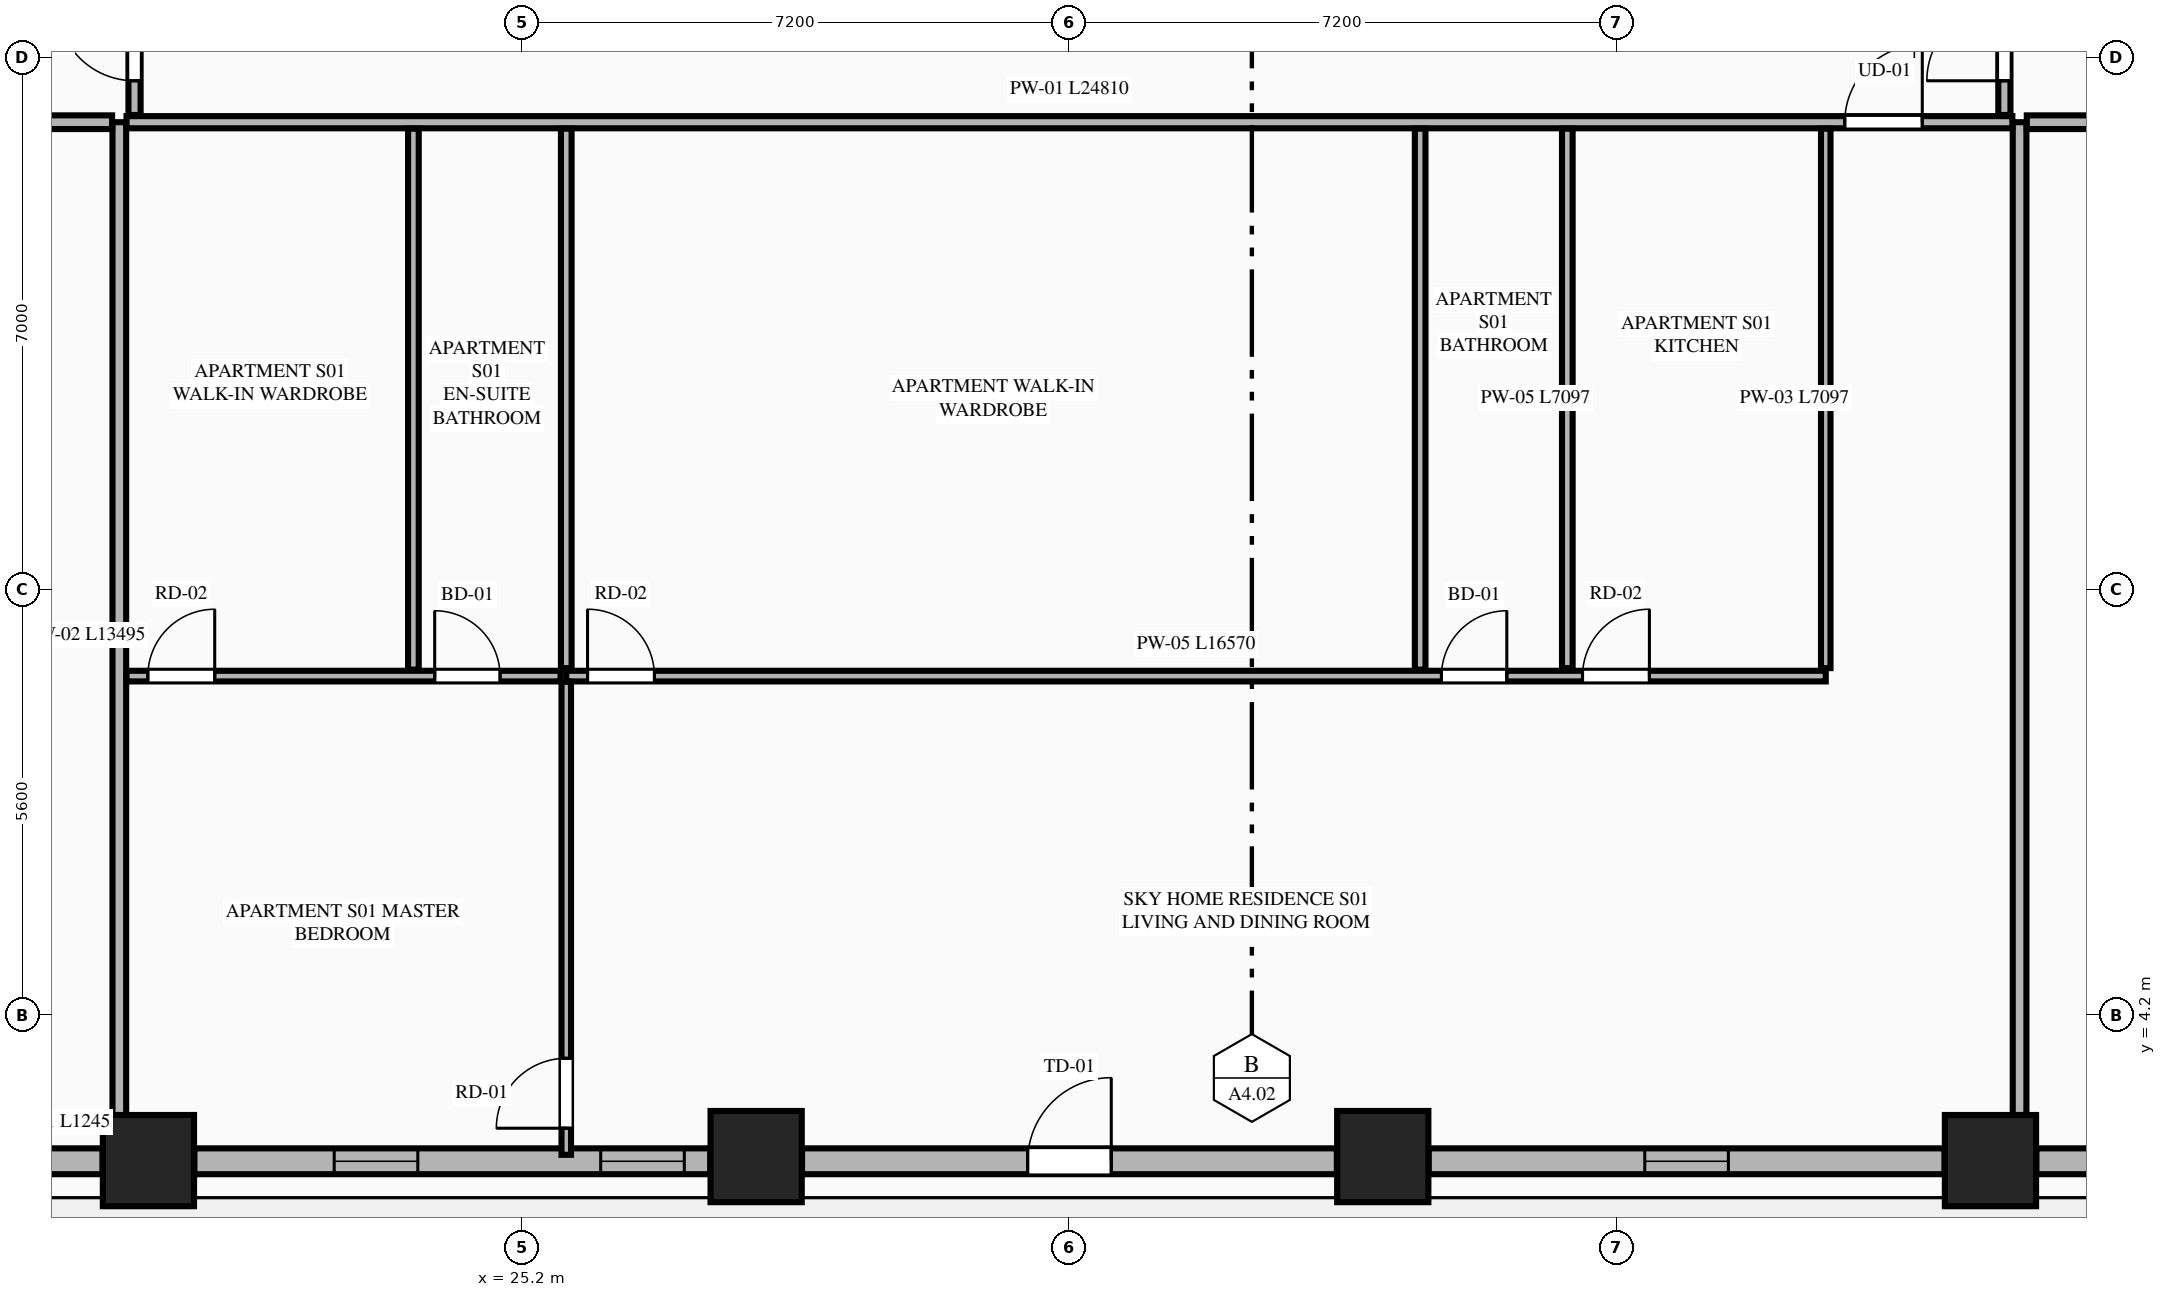
"""IFC4 building model, lengths in metres.
Left out: names, types, materials, properties, quantities, classifications, styles, units other than length and angle.
Written with IfcOpenShell. Run it as: python <this file> out.ifc"""

import sys

from ifc_helpers import new_model, si_unit, direction, frame, frame_2d, origin, origin_2d, place, context, subcontext, project, spatial, rectangle, extrude, element, fill, save


model = new_model("IFC4")
c1 = context("Model", 3, precision=1e-05, world=origin(), true_north=direction((0.0, 1.0)))
c2 = subcontext(c1, "Body", "Model", "MODEL_VIEW")
j1 = project(units=[si_unit("LENGTHUNIT", "METRE"), si_unit("PLANEANGLEUNIT", "RADIAN")], contexts=[c1])
p1 = place(None, origin())
s1 = spatial("IfcSite", under=j1, at=p1, CompositionType="ELEMENT")
p2 = place(p1, origin())
s2 = spatial("IfcBuilding", under=s1, at=p2, CompositionType="ELEMENT")
p3 = place(p2, frame((0.0, 0.0, 46.2)))
s3 = spatial("IfcBuildingStorey", under=s2, at=p3, CompositionType="ELEMENT", Elevation=46.2)
for number, where, z_axis, x_axis in (
    (1, (20.283, 2.289, 0.0), (0.0, 0.0, 1.0), (1.0, 0.0, 0.0)),
    (2, (28.278, 2.342, 0.0), (0.0, 0.0, 1.0), (1.0, 0.0, 0.0)),
    (3, (36.522, 2.342, 0.0), (0.0, 0.0, 1.0), (1.0, 0.0, 0.0)),
    (4, (44.517, 2.289, 0.0), (0.0, 0.0, 1.0), (1.0, 0.0, 0.0)),
):
    element("IfcColumn", number, at=place(p3, frame(where, z_axis=z_axis, x_axis=x_axis)), inside=s3, PredefinedType="COLUMN", context=c2, shape_type="SweptSolid", body=[
        extrude(rectangle(XDim=1.2, YDim=1.2, at=origin_2d()), origin(), (0.0, 0.0, 1.0), 3.55),
    ])
p4 = place(p3, frame((18.434, 2.28, 0.0), z_axis=(0.0, 0.0, 1.0), x_axis=(1.0, 0.0, 0.0)))
e5 = element("IfcWall", 5, at=p4, inside=s3, PredefinedType="STANDARD", context=c2, shape_type="SweptSolid", body=[
    extrude(rectangle(XDim=1.245, YDim=0.34, at=frame_2d((0.623, 0.0))), origin(), (0.0, 0.0, 1.0), 3.33),
])
p5 = place(p3, frame((20.887, 2.28, 0.0), z_axis=(0.0, 0.0, 1.0), x_axis=(1.0, 0.0, 0.0)))
e6 = element("IfcWall", 6, at=p5, inside=s3, PredefinedType="STANDARD", context=c2, shape_type="SweptSolid", body=[
    extrude(rectangle(XDim=6.787, YDim=0.34, at=frame_2d((3.394, 0.0))), origin(), (0.0, 0.0, 1.0), 2.787),
])
p6 = place(p5, frame((1.84, 0.0, 0.75)))
e7 = element("IfcOpeningElement", 7, at=p6, cuts=e6, PredefinedType="OPENING", context=c2, shape_type="SweptSolid", body=[
    extrude(rectangle(XDim=1.1, YDim=1.887, at=frame_2d((0.55, 0.943))), frame((0.0, 0.18, 0.0), z_axis=(0.0, -1.0, 0.0), x_axis=(1.0, 0.0, 0.0)), (0.0, 0.0, 1.0), 0.36),
])
p7 = place(p5, frame((5.346, 0.0, 0.75)))
e8 = element("IfcOpeningElement", 8, at=p7, cuts=e6, PredefinedType="OPENING", context=c2, shape_type="SweptSolid", body=[
    extrude(rectangle(XDim=1.1, YDim=1.887, at=frame_2d((0.55, 0.943))), frame((0.0, 0.18, 0.0), z_axis=(0.0, -1.0, 0.0), x_axis=(1.0, 0.0, 0.0)), (0.0, 0.0, 1.0), 0.36),
])
p8 = place(p3, frame((28.882, 2.28, 0.0), z_axis=(0.0, 0.0, 1.0), x_axis=(1.0, 0.0, 0.0)))
e9 = element("IfcWall", 9, at=p8, inside=s3, PredefinedType="STANDARD", context=c2, shape_type="SweptSolid", body=[
    extrude(rectangle(XDim=7.036, YDim=0.34, at=frame_2d((3.518, 0.0))), origin(), (0.0, 0.0, 1.0), 2.787),
])
p9 = place(p8, frame((2.968, 0.0, 0.0)))
e10 = element("IfcOpeningElement", 10, at=p9, cuts=e9, PredefinedType="OPENING", context=c2, shape_type="SweptSolid", body=[
    extrude(rectangle(XDim=1.1, YDim=2.25, at=frame_2d((0.55, 1.125))), frame((0.0, 0.18, 0.0), z_axis=(0.0, -1.0, 0.0), x_axis=(1.0, 0.0, 0.0)), (0.0, 0.0, 1.0), 0.36),
])
p10 = place(p3, frame((37.126, 2.28, 0.0), z_axis=(0.0, 0.0, 1.0), x_axis=(1.0, 0.0, 0.0)))
e11 = element("IfcWall", 11, at=p10, inside=s3, PredefinedType="STANDARD", context=c2, shape_type="SweptSolid", body=[
    extrude(rectangle(XDim=6.787, YDim=0.34, at=frame_2d((3.394, 0.0))), origin(), (0.0, 0.0, 1.0), 2.787),
])
p11 = place(p10, frame((2.843, 0.0, 0.75)))
e12 = element("IfcOpeningElement", 12, at=p11, cuts=e11, PredefinedType="OPENING", context=c2, shape_type="SweptSolid", body=[
    extrude(rectangle(XDim=1.1, YDim=1.887, at=frame_2d((0.55, 0.943))), frame((0.0, 0.18, 0.0), z_axis=(0.0, -1.0, 0.0), x_axis=(1.0, 0.0, 0.0)), (0.0, 0.0, 1.0), 0.36),
])
p12 = place(p3, frame((45.121, 2.28, 0.0), z_axis=(0.0, 0.0, 1.0), x_axis=(1.0, 0.0, 0.0)))
e13 = element("IfcWall", 13, at=p12, inside=s3, PredefinedType="STANDARD", context=c2, shape_type="SweptSolid", body=[
    extrude(rectangle(XDim=1.245, YDim=0.34, at=frame_2d((0.623, 0.0))), origin(), (0.0, 0.0, 1.0), 3.33),
])
for number, where, z_axis, x_axis in (
    (14, (19.9, 2.455, 0.0), (0.0, 0.0, 1.0), (0.0, 1.0, 0.0)),
    (15, (44.9, 2.455, 0.0), (0.0, 0.0, 1.0), (0.0, 1.0, 0.0)),
):
    element("IfcWall", number, at=place(p3, frame(where, z_axis=z_axis, x_axis=x_axis)), inside=s3, PredefinedType="PARTITIONING", context=c2, shape_type="SweptSolid", body=[
        extrude(rectangle(XDim=13.495, YDim=0.18, at=frame_2d((6.748, 0.0))), origin(), (0.0, 0.0, 1.0), 3.33),
    ])
p13 = place(p3, frame((19.995, 15.95, 0.0), z_axis=(0.0, 0.0, 1.0), x_axis=(1.0, 0.0, 0.0)))
e16 = element("IfcWall", 16, at=p13, inside=s3, PredefinedType="PARTITIONING", context=c2, shape_type="SweptSolid", body=[
    extrude(rectangle(XDim=24.81, YDim=0.16, at=frame_2d((12.405, 0.0))), origin(), (0.0, 0.0, 1.0), 3.33),
])
p14 = place(p13, frame((22.605, 0.0, 0.0)))
e17 = element("IfcOpeningElement", 17, at=p14, cuts=e16, PredefinedType="OPENING", context=c2, shape_type="SweptSolid", body=[
    extrude(rectangle(XDim=1.02, YDim=2.25, at=frame_2d((0.51, 1.125))), frame((0.0, 0.09, 0.0), z_axis=(0.0, -1.0, 0.0), x_axis=(1.0, 0.0, 0.0)), (0.0, 0.0, 1.0), 0.18),
])
p15 = place(p3, frame((42.35, 8.768, 0.0), z_axis=(0.0, 0.0, 1.0), x_axis=(0.0, 1.0, 0.0)))
e18 = element("IfcWall", 18, at=p15, inside=s3, PredefinedType="PARTITIONING", context=c2, shape_type="SweptSolid", body=[
    extrude(rectangle(XDim=7.097, YDim=0.125, at=frame_2d((3.548, 0.0))), origin(), (0.0, 0.0, 1.0), 2.637),
])
p16 = place(p3, frame((25.78, 8.663, 0.0), z_axis=(0.0, 0.0, 1.0), x_axis=(1.0, 0.0, 0.0)))
e19 = element("IfcWall", 19, at=p16, inside=s3, PredefinedType="PLUMBINGWALL", context=c2, shape_type="SweptSolid", body=[
    extrude(rectangle(XDim=16.57, YDim=0.14, at=frame_2d((8.285, 0.0))), origin(), (0.0, 0.0, 1.0), 3.33),
])
p17 = place(p16, frame((0.28, 0.0, 0.0)))
e20 = element("IfcOpeningElement", 20, at=p17, cuts=e19, PredefinedType="OPENING", context=c2, shape_type="SweptSolid", body=[
    extrude(rectangle(XDim=0.88, YDim=2.15, at=frame_2d((0.44, 1.075))), frame((0.0, 0.08, 0.0), z_axis=(0.0, -1.0, 0.0), x_axis=(1.0, 0.0, 0.0)), (0.0, 0.0, 1.0), 0.16),
])
p18 = place(p16, frame((11.514, 0.0, 0.0)))
e21 = element("IfcOpeningElement", 21, at=p18, cuts=e19, PredefinedType="OPENING", context=c2, shape_type="SweptSolid", body=[
    extrude(rectangle(XDim=0.86, YDim=2.1, at=frame_2d((0.43, 1.05))), frame((0.0, 0.08, 0.0), z_axis=(0.0, -1.0, 0.0), x_axis=(1.0, 0.0, 0.0)), (0.0, 0.0, 1.0), 0.16),
])
p19 = place(p16, frame((13.37, 0.0, 0.0)))
e22 = element("IfcOpeningElement", 22, at=p19, cuts=e19, PredefinedType="OPENING", context=c2, shape_type="SweptSolid", body=[
    extrude(rectangle(XDim=0.88, YDim=2.15, at=frame_2d((0.44, 1.075))), frame((0.0, 0.08, 0.0), z_axis=(0.0, -1.0, 0.0), x_axis=(1.0, 0.0, 0.0)), (0.0, 0.0, 1.0), 0.16),
])
p20 = place(p3, frame((19.995, 8.663, 0.0), z_axis=(0.0, 0.0, 1.0), x_axis=(1.0, 0.0, 0.0)))
e23 = element("IfcWall", 23, at=p20, inside=s3, PredefinedType="PLUMBINGWALL", context=c2, shape_type="SweptSolid", body=[
    extrude(rectangle(XDim=5.71, YDim=0.14, at=frame_2d((2.855, 0.0))), origin(), (0.0, 0.0, 1.0), 3.33),
])
p21 = place(p20, frame((0.28, 0.0, 0.0)))
e24 = element("IfcOpeningElement", 24, at=p21, cuts=e23, PredefinedType="OPENING", context=c2, shape_type="SweptSolid", body=[
    extrude(rectangle(XDim=0.88, YDim=2.15, at=frame_2d((0.44, 1.075))), frame((0.0, 0.08, 0.0), z_axis=(0.0, -1.0, 0.0), x_axis=(1.0, 0.0, 0.0)), (0.0, 0.0, 1.0), 0.16),
])
p22 = place(p20, frame((4.054, 0.0, 0.0)))
e25 = element("IfcOpeningElement", 25, at=p22, cuts=e23, PredefinedType="OPENING", context=c2, shape_type="SweptSolid", body=[
    extrude(rectangle(XDim=0.86, YDim=2.1, at=frame_2d((0.43, 1.05))), frame((0.0, 0.08, 0.0), z_axis=(0.0, -1.0, 0.0), x_axis=(1.0, 0.0, 0.0)), (0.0, 0.0, 1.0), 0.16),
])
for number, where, z_axis, x_axis in (
    (26, (38.95, 8.768, 0.0), (0.0, 0.0, 1.0), (0.0, 1.0, 0.0)),
    (27, (25.78, 8.768, 0.0), (0.0, 0.0, 1.0), (0.0, 1.0, 0.0)),
):
    element("IfcWall", number, at=place(p3, frame(where, z_axis=z_axis, x_axis=x_axis)), inside=s3, PredefinedType="PLUMBINGWALL", context=c2, shape_type="SweptSolid", body=[
        extrude(rectangle(XDim=7.097, YDim=0.14, at=frame_2d((3.548, 0.0))), origin(), (0.0, 0.0, 1.0), 3.33),
    ])
p23 = place(p3, frame((25.78, 2.365, 0.0), z_axis=(0.0, 0.0, 1.0), x_axis=(0.0, 1.0, 0.0)))
e28 = element("IfcWall", 28, at=p23, inside=s3, PredefinedType="PARTITIONING", context=c2, shape_type="SweptSolid", body=[
    extrude(rectangle(XDim=6.223, YDim=0.125, at=frame_2d((3.111, 0.0))), origin(), (0.0, 0.0, 1.0), 3.33),
])
p24 = place(p23, frame((0.35, 0.0, 0.0)))
e29 = element("IfcOpeningElement", 29, at=p24, cuts=e28, PredefinedType="OPENING", context=c2, shape_type="SweptSolid", body=[
    extrude(rectangle(XDim=0.92, YDim=2.15, at=frame_2d((0.46, 1.075))), frame((0.0, 0.073, 0.0), z_axis=(0.0, -1.0, 0.0), x_axis=(1.0, 0.0, 0.0)), (0.0, 0.0, 1.0), 0.145),
])
for number, where, z_axis, x_axis in (
    (30, (37.014, 8.748, 0.0), (0.0, 0.0, 1.0), (0.0, 1.0, 0.0)),
    (31, (23.769, 8.748, 0.0), (0.0, 0.0, 1.0), (0.0, 1.0, 0.0)),
):
    element("IfcWall", number, at=place(p3, frame(where, z_axis=z_axis, x_axis=x_axis)), inside=s3, PredefinedType="PLUMBINGWALL", context=c2, shape_type="SweptSolid", body=[
        extrude(rectangle(XDim=7.117, YDim=0.14, at=frame_2d((3.559, 0.0))), origin(), (0.0, 0.0, 1.0), 3.33),
    ])
for number, where, z_axis, x_axis in (
    (32, (10.564, 15.95, 0.0), (0.0, 0.0, 1.0), (1.0, 0.0, 0.0)),
    (33, (44.995, 15.95, 0.0), (0.0, 0.0, 1.0), (1.0, 0.0, 0.0)),
):
    element("IfcWall", number, at=place(p3, frame(where, z_axis=z_axis, x_axis=x_axis)), inside=s3, PredefinedType="PARTITIONING", context=c2, shape_type="SweptSolid", body=[
        extrude(rectangle(XDim=9.241, YDim=0.18, at=frame_2d((4.621, 0.0))), origin(), (0.0, 0.0, 1.0), 3.33),
    ])
p25 = place(p3, frame((20.1, 16.045, 0.0), z_axis=(0.0, 0.0, 1.0), x_axis=(0.0, 1.0, 0.0)))
e34 = element("IfcWall", 34, at=p25, inside=s3, PredefinedType="PARTITIONING", context=c2, shape_type="SweptSolid", body=[
    extrude(rectangle(XDim=19.71, YDim=0.16, at=frame_2d((9.855, 0.0))), origin(), (0.0, 0.0, 1.0), 3.33),
])
p26 = place(p25, frame((0.45, 0.0, 0.0)))
e35 = element("IfcOpeningElement", 35, at=p26, cuts=e34, PredefinedType="OPENING", context=c2, shape_type="SweptSolid", body=[
    extrude(rectangle(XDim=1.02, YDim=2.25, at=frame_2d((0.51, 1.125))), frame((0.0, 0.09, 0.0), z_axis=(0.0, -1.0, 0.0), x_axis=(1.0, 0.0, 0.0)), (0.0, 0.0, 1.0), 0.18),
])
p27 = place(p3, frame((44.7, 16.045, 0.0), z_axis=(0.0, 0.0, 1.0), x_axis=(0.0, 1.0, 0.0)))
e36 = element("IfcWall", 36, at=p27, inside=s3, PredefinedType="PARTITIONING", context=c2, shape_type="SweptSolid", body=[
    extrude(rectangle(XDim=19.71, YDim=0.16, at=frame_2d((9.855, 0.0))), origin(), (0.0, 0.0, 1.0), 3.33),
])
p28 = place(p27, frame((0.45, 0.0, 0.0)))
e37 = element("IfcOpeningElement", 37, at=p28, cuts=e36, PredefinedType="OPENING", context=c2, shape_type="SweptSolid", body=[
    extrude(rectangle(XDim=1.02, YDim=2.25, at=frame_2d((0.51, 1.125))), frame((0.0, 0.09, 0.0), z_axis=(0.0, -1.0, 0.0), x_axis=(1.0, 0.0, 0.0)), (0.0, 0.0, 1.0), 0.18),
])
p29 = place(p6, origin())
e38 = element("IfcWindow", 38, at=p29, inside=s3, PartitioningType="SINGLE_PANEL", PredefinedType="WINDOW", context=c2, shape_type="SweptSolid", body=[
    extrude(rectangle(XDim=1.1, YDim=1.887, at=frame_2d((0.55, 0.943))), frame((0.0, 0.03, 0.0), z_axis=(0.0, -1.0, 0.0), x_axis=(1.0, 0.0, 0.0)), (0.0, 0.0, 1.0), 0.06),
])
fill(e7, e38)
p30 = place(p9, origin())
e39 = element("IfcDoor", 39, at=p30, inside=s3, OperationType="SINGLE_SWING_RIGHT", PredefinedType="DOOR", context=c2, shape_type="SweptSolid", body=[
    extrude(rectangle(XDim=1.1, YDim=2.25, at=frame_2d((0.55, 1.125))), frame((0.0, 0.025, 0.0), z_axis=(0.0, -1.0, 0.0), x_axis=(1.0, 0.0, 0.0)), (0.0, 0.0, 1.0), 0.05),
])
fill(e10, e39)
p31 = place(p11, origin())
e40 = element("IfcWindow", 40, at=p31, inside=s3, PartitioningType="SINGLE_PANEL", PredefinedType="WINDOW", context=c2, shape_type="SweptSolid", body=[
    extrude(rectangle(XDim=1.1, YDim=1.887, at=frame_2d((0.55, 0.943))), frame((0.0, 0.03, 0.0), z_axis=(0.0, -1.0, 0.0), x_axis=(1.0, 0.0, 0.0)), (0.0, 0.0, 1.0), 0.06),
])
fill(e12, e40)
p32 = place(p17, origin())
e41 = element("IfcDoor", 41, at=p32, inside=s3, OperationType="SINGLE_SWING_LEFT", PredefinedType="DOOR", context=c2, shape_type="SweptSolid", body=[
    extrude(rectangle(XDim=0.88, YDim=2.15, at=frame_2d((0.44, 1.075))), frame((0.0, 0.025, 0.0), z_axis=(0.0, -1.0, 0.0), x_axis=(1.0, 0.0, 0.0)), (0.0, 0.0, 1.0), 0.05),
])
fill(e20, e41)
p33 = place(p18, origin())
e42 = element("IfcDoor", 42, at=p33, inside=s3, OperationType="SINGLE_SWING_RIGHT", PredefinedType="DOOR", context=c2, shape_type="SweptSolid", body=[
    extrude(rectangle(XDim=0.86, YDim=2.1, at=frame_2d((0.43, 1.05))), frame((0.0, 0.025, 0.0), z_axis=(0.0, -1.0, 0.0), x_axis=(1.0, 0.0, 0.0)), (0.0, 0.0, 1.0), 0.05),
])
fill(e21, e42)
p34 = place(p21, origin())
e43 = element("IfcDoor", 43, at=p34, inside=s3, OperationType="SINGLE_SWING_RIGHT", PredefinedType="DOOR", context=c2, shape_type="SweptSolid", body=[
    extrude(rectangle(XDim=0.88, YDim=2.15, at=frame_2d((0.44, 1.075))), frame((0.0, 0.025, 0.0), z_axis=(0.0, -1.0, 0.0), x_axis=(1.0, 0.0, 0.0)), (0.0, 0.0, 1.0), 0.05),
])
fill(e24, e43)
p35 = place(p22, origin())
e44 = element("IfcDoor", 44, at=p35, inside=s3, OperationType="SINGLE_SWING_LEFT", PredefinedType="DOOR", context=c2, shape_type="SweptSolid", body=[
    extrude(rectangle(XDim=0.86, YDim=2.1, at=frame_2d((0.43, 1.05))), frame((0.0, 0.025, 0.0), z_axis=(0.0, -1.0, 0.0), x_axis=(1.0, 0.0, 0.0)), (0.0, 0.0, 1.0), 0.05),
])
fill(e25, e44)
p36 = place(p14, origin())
e45 = element("IfcDoor", 45, at=p36, inside=s3, OperationType="SINGLE_SWING_RIGHT", PredefinedType="DOOR", context=c2, shape_type="SweptSolid", body=[
    extrude(rectangle(XDim=1.02, YDim=2.25, at=frame_2d((0.51, 1.125))), frame((0.0, 0.025, 0.0), z_axis=(0.0, -1.0, 0.0), x_axis=(1.0, 0.0, 0.0)), (0.0, 0.0, 1.0), 0.05),
])
fill(e17, e45)
p37 = place(p19, origin())
e46 = element("IfcDoor", 46, at=p37, inside=s3, OperationType="SINGLE_SWING_RIGHT", PredefinedType="DOOR", context=c2, shape_type="SweptSolid", body=[
    extrude(rectangle(XDim=0.88, YDim=2.15, at=frame_2d((0.44, 1.075))), frame((0.0, 0.025, 0.0), z_axis=(0.0, -1.0, 0.0), x_axis=(1.0, 0.0, 0.0)), (0.0, 0.0, 1.0), 0.05),
])
fill(e22, e46)
p38 = place(p24, origin())
e47 = element("IfcDoor", 47, at=p38, inside=s3, OperationType="SINGLE_SWING_LEFT", PredefinedType="DOOR", context=c2, shape_type="SweptSolid", body=[
    extrude(rectangle(XDim=0.92, YDim=2.15, at=frame_2d((0.46, 1.075))), frame((0.0, 0.025, 0.0), z_axis=(0.0, -1.0, 0.0), x_axis=(1.0, 0.0, 0.0)), (0.0, 0.0, 1.0), 0.05),
])
fill(e29, e47)
p39 = place(p26, origin())
e48 = element("IfcDoor", 48, at=p39, inside=s3, OperationType="SINGLE_SWING_RIGHT", PredefinedType="DOOR", context=c2, shape_type="SweptSolid", body=[
    extrude(rectangle(XDim=1.02, YDim=2.25, at=frame_2d((0.51, 1.125))), frame((0.0, 0.025, 0.0), z_axis=(0.0, -1.0, 0.0), x_axis=(1.0, 0.0, 0.0)), (0.0, 0.0, 1.0), 0.05),
])
fill(e35, e48)
p40 = place(p28, origin())
e49 = element("IfcDoor", 49, at=p40, inside=s3, OperationType="SINGLE_SWING_LEFT", PredefinedType="DOOR", context=c2, shape_type="SweptSolid", body=[
    extrude(rectangle(XDim=1.02, YDim=2.25, at=frame_2d((0.51, 1.125))), frame((0.0, 0.025, 0.0), z_axis=(0.0, -1.0, 0.0), x_axis=(1.0, 0.0, 0.0)), (0.0, 0.0, 1.0), 0.05),
])
fill(e37, e49)
p41 = place(p7, origin())
e50 = element("IfcWindow", 50, at=p41, inside=s3, PartitioningType="SINGLE_PANEL", PredefinedType="WINDOW", context=c2, shape_type="SweptSolid", body=[
    extrude(rectangle(XDim=1.1, YDim=1.887, at=frame_2d((0.55, 0.943))), frame((0.0, 0.03, 0.0), z_axis=(0.0, -1.0, 0.0), x_axis=(1.0, 0.0, 0.0)), (0.0, 0.0, 1.0), 0.06),
])
fill(e8, e50)
save(model, sys.argv[1])
